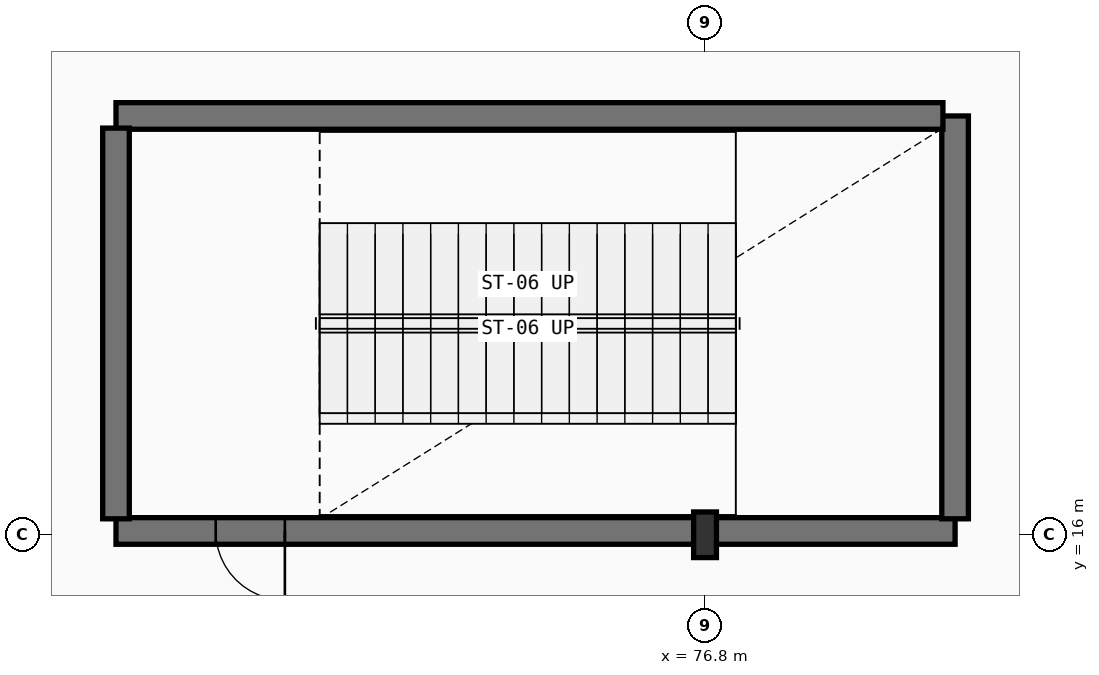
"""IFC4 building model, lengths in metres.
Left out: names, types, materials, properties, quantities, classifications, styles, units other than length and angle.
Written with IfcOpenShell. Run it as: python <this file> out.ifc"""

import sys

from ifc_helpers import new_model, si_unit, direction, frame, frame_2d, origin, origin_2d, place, context, subcontext, project, spatial, rectangle, i_section, extrude, element, fill, save


model = new_model("IFC4")
c1 = context("Model", 3, precision=1e-05, world=origin(), true_north=direction((0.0, 1.0)))
c2 = subcontext(c1, "Body", "Model", "MODEL_VIEW")
j1 = project(units=[si_unit("LENGTHUNIT", "METRE"), si_unit("PLANEANGLEUNIT", "RADIAN")], contexts=[c1])
p1 = place(None, origin())
s1 = spatial("IfcSite", under=j1, at=p1, CompositionType="ELEMENT")
p2 = place(p1, origin())
s2 = spatial("IfcBuilding", under=s1, at=p2, CompositionType="ELEMENT")
p3 = place(p2, origin())
s3 = spatial("IfcBuildingStorey", under=s2, at=p3, CompositionType="ELEMENT", Elevation=0.0)
p4 = place(p3, frame((76.8, 16.0, 0.0), z_axis=(0.0, 0.0, 1.0), x_axis=(1.0, 0.0, 0.0)))
e1 = element("IfcColumn", 1, at=p4, inside=s3, PredefinedType="COLUMN", context=c2, shape_type="SweptSolid", body=[
    extrude(i_section(OverallWidth=0.3, OverallDepth=0.6, WebThickness=0.015, FlangeThickness=0.03, FilletRadius=0.027, at=origin_2d()), origin(), (0.0, 0.0, 1.0), 6.0),
])
p5 = place(p3, frame((80.09, 16.05, 0.0), z_axis=(0.0, 0.0, 1.0), x_axis=(-1.0, 0.0, 0.0)))
e2 = element("IfcWall", 2, at=p5, inside=s3, PredefinedType="SHEAR", context=c2, shape_type="SweptSolid", body=[
    extrude(rectangle(XDim=11.04, YDim=0.35, at=frame_2d((5.52, 0.0))), origin(), (0.0, 0.0, 1.0), 5.77),
])
p6 = place(p5, frame((8.818, 0.0, 0.0)))
e3 = element("IfcOpeningElement", 3, at=p6, cuts=e2, PredefinedType="OPENING", context=c2, shape_type="SweptSolid", body=[
    extrude(rectangle(XDim=0.91, YDim=2.08, at=frame_2d((0.455, 1.04))), frame((0.0, 0.185, 0.0), z_axis=(0.0, -1.0, 0.0), x_axis=(1.0, 0.0, 0.0)), (0.0, 0.0, 1.0), 0.37),
])
p7 = place(p3, frame((80.09, 21.51, 0.0), z_axis=(0.0, 0.0, 1.0), x_axis=(0.0, -1.0, 0.0)))
e4 = element("IfcWall", 4, at=p7, inside=s3, PredefinedType="SHEAR", context=c2, shape_type="SweptSolid", body=[
    extrude(rectangle(XDim=5.3, YDim=0.35, at=frame_2d((2.65, 0.0))), origin(), (0.0, 0.0, 1.0), 5.77),
])
p8 = place(p3, frame((69.05, 21.51, 0.0), z_axis=(0.0, 0.0, 1.0), x_axis=(1.0, 0.0, 0.0)))
e5 = element("IfcWall", 5, at=p8, inside=s3, PredefinedType="SHEAR", context=c2, shape_type="SweptSolid", body=[
    extrude(rectangle(XDim=10.88, YDim=0.35, at=frame_2d((5.44, 0.0))), origin(), (0.0, 0.0, 1.0), 5.77),
])
p9 = place(p3, frame((69.05, 16.21, 0.0), z_axis=(0.0, 0.0, 1.0), x_axis=(0.0, 1.0, 0.0)))
e6 = element("IfcWall", 6, at=p9, inside=s3, PredefinedType="SHEAR", context=c2, shape_type="SweptSolid", body=[
    extrude(rectangle(XDim=5.14, YDim=0.35, at=frame_2d((2.57, 0.0))), origin(), (0.0, 0.0, 1.0), 5.77),
])
p10 = place(p6, origin())
e7 = element("IfcDoor", 7, at=p10, inside=s3, OperationType="SINGLE_SWING_LEFT", PredefinedType="DOOR", context=c2, shape_type="SweptSolid", body=[
    extrude(rectangle(XDim=0.91, YDim=2.08, at=frame_2d((0.455, 1.04))), frame((0.0, 0.025, 0.0), z_axis=(0.0, -1.0, 0.0), x_axis=(1.0, 0.0, 0.0)), (0.0, 0.0, 1.0), 0.05),
])
fill(e3, e7)
save(model, sys.argv[1])
